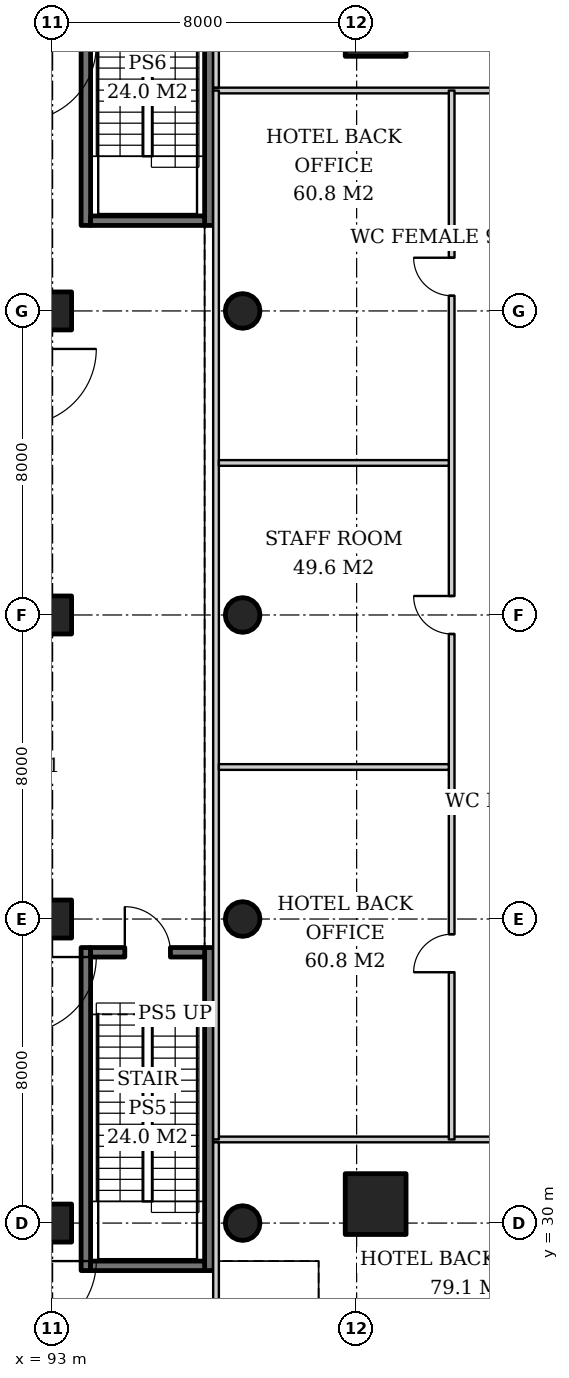
"""IFC4 building model, lengths in metres.
Left out: names, types, materials, properties, quantities, classifications, styles, units other than length and angle.
Written with IfcOpenShell. Run it as: python <this file> out.ifc"""

import sys

from ifc_helpers import new_model, si_unit, direction, frame, frame_2d, origin, origin_2d, place, context, subcontext, project, spatial, rectangle, hollow_circle, extrude, element, fill, save


model = new_model("IFC4")
c1 = context("Model", 3, precision=1e-05, world=origin(), true_north=direction((0.0, 1.0)))
c2 = subcontext(c1, "Body", "Model", "MODEL_VIEW")
j1 = project(units=[si_unit("LENGTHUNIT", "METRE"), si_unit("PLANEANGLEUNIT", "RADIAN")], contexts=[c1])
p1 = place(None, origin())
s1 = spatial("IfcSite", under=j1, at=p1, CompositionType="ELEMENT")
p2 = place(p1, origin())
s2 = spatial("IfcBuilding", under=s1, at=p2, CompositionType="ELEMENT")
p3 = place(p2, origin())
s3 = spatial("IfcBuildingStorey", under=s2, at=p3, CompositionType="ELEMENT", Elevation=0.0)
for number, where, z_axis, x_axis in (
    (1, (93.0, 30.0, 0.0), (0.0, 0.0, 1.0), (1.0, 0.0, 0.0)),
    (2, (93.0, 38.0, 0.0), (0.0, 0.0, 1.0), (1.0, 0.0, 0.0)),
    (3, (93.0, 46.0, 0.0), (0.0, 0.0, 1.0), (1.0, 0.0, 0.0)),
    (4, (93.0, 54.0, 0.0), (0.0, 0.0, 1.0), (1.0, 0.0, 0.0)),
):
    element("IfcColumn", number, at=place(p3, frame(where, z_axis=z_axis, x_axis=x_axis)), inside=s3, PredefinedType="COLUMN", context=c2, shape_type="SweptSolid", body=[
        extrude(rectangle(XDim=1.0, YDim=1.0, at=origin_2d()), origin(), (0.0, 0.0, 1.0), 6.0),
    ])
for number, where, z_axis, x_axis in (
    (5, (101.5, 61.5, 0.0), (0.0, 0.0, 1.0), (1.0, 0.0, 0.0)),
    (6, (101.5, 30.5, 0.0), (0.0, 0.0, 1.0), (1.0, 0.0, 0.0)),
):
    element("IfcColumn", number, at=place(p3, frame(where, z_axis=z_axis, x_axis=x_axis)), inside=s3, PredefinedType="COLUMN", context=c2, shape_type="SweptSolid", body=[
        extrude(rectangle(XDim=1.6, YDim=1.6, at=origin_2d()), origin(), (0.0, 0.0, 1.0), 6.0),
    ])
for number, where, z_axis, x_axis in (
    (7, (98.0, 30.0, 0.0), (0.0, 0.0, 1.0), (1.0, 0.0, 0.0)),
    (8, (98.0, 54.0, 0.0), (0.0, 0.0, 1.0), (1.0, 0.0, 0.0)),
    (9, (98.0, 46.0, 0.0), (0.0, 0.0, 1.0), (1.0, 0.0, 0.0)),
    (10, (98.0, 38.0, 0.0), (0.0, 0.0, 1.0), (1.0, 0.0, 0.0)),
):
    element("IfcColumn", number, at=place(p3, frame(where, z_axis=z_axis, x_axis=x_axis)), inside=s3, PredefinedType="COLUMN", context=c2, shape_type="SweptSolid", body=[
        extrude(hollow_circle(Radius=0.457, WallThickness=0.03, at=origin_2d()), origin(), (0.0, 0.0, 1.0), 6.0),
    ])
for number, where, z_axis, x_axis in (
    (11, (93.875, 28.75, 0.0), (0.0, 0.0, 1.0), (0.0, 1.0, 0.0)),
    (12, (97.125, 28.75, 0.0), (0.0, 0.0, 1.0), (0.0, 1.0, 0.0)),
):
    element("IfcWall", number, at=place(p3, frame(where, z_axis=z_axis, x_axis=x_axis)), inside=s3, PredefinedType="SOLIDWALL", context=c2, shape_type="SweptSolid", body=[
        extrude(rectangle(XDim=8.5, YDim=0.25, at=frame_2d((4.25, 0.0))), origin(), (0.0, 0.0, 1.0), 5.7),
    ])
p4 = place(p3, frame((94.0, 28.875, 0.0), z_axis=(0.0, 0.0, 1.0), x_axis=(1.0, 0.0, 0.0)))
e13 = element("IfcWall", 13, at=p4, inside=s3, PredefinedType="SOLIDWALL", context=c2, shape_type="SweptSolid", body=[
    extrude(rectangle(XDim=3.0, YDim=0.25, at=frame_2d((1.5, 0.0))), origin(), (0.0, 0.0, 1.0), 5.7),
])
p5 = place(p3, frame((94.0, 37.125, 0.0), z_axis=(0.0, 0.0, 1.0), x_axis=(1.0, 0.0, 0.0)))
e14 = element("IfcWall", 14, at=p5, inside=s3, PredefinedType="SOLIDWALL", context=c2, shape_type="SweptSolid", body=[
    extrude(rectangle(XDim=3.0, YDim=0.25, at=frame_2d((1.5, 0.0))), origin(), (0.0, 0.0, 1.0), 5.7),
])
p6 = place(p5, frame((0.9, 0.0, 0.0)))
e15 = element("IfcOpeningElement", 15, at=p6, cuts=e14, PredefinedType="OPENING", context=c2, shape_type="SweptSolid", body=[
    extrude(rectangle(XDim=1.2, YDim=2.1, at=frame_2d((0.6, 1.05))), frame((0.0, 0.135, 0.0), z_axis=(0.0, -1.0, 0.0), x_axis=(1.0, 0.0, 0.0)), (0.0, 0.0, 1.0), 0.27),
])
for number, where, z_axis, x_axis in (
    (16, (93.875, 56.25, 0.0), (0.0, 0.0, 1.0), (0.0, 1.0, 0.0)),
    (17, (97.125, 56.25, 0.0), (0.0, 0.0, 1.0), (0.0, 1.0, 0.0)),
):
    element("IfcWall", number, at=place(p3, frame(where, z_axis=z_axis, x_axis=x_axis)), inside=s3, PredefinedType="SOLIDWALL", context=c2, shape_type="SweptSolid", body=[
        extrude(rectangle(XDim=8.5, YDim=0.25, at=frame_2d((4.25, 0.0))), origin(), (0.0, 0.0, 1.0), 5.7),
    ])
p7 = place(p3, frame((94.0, 56.375, 0.0), z_axis=(0.0, 0.0, 1.0), x_axis=(1.0, 0.0, 0.0)))
e18 = element("IfcWall", 18, at=p7, inside=s3, PredefinedType="SOLIDWALL", context=c2, shape_type="SweptSolid", body=[
    extrude(rectangle(XDim=3.0, YDim=0.25, at=frame_2d((1.5, 0.0))), origin(), (0.0, 0.0, 1.0), 5.7),
])
p8 = place(p3, frame((97.225, 32.2, 0.0), z_axis=(0.0, 0.0, 1.0), x_axis=(1.0, 0.0, 0.0)))
e19 = element("IfcWall", 19, at=p8, inside=s3, PredefinedType="PARTITIONING", context=c2, shape_type="SweptSolid", body=[
    extrude(rectangle(XDim=13.4, YDim=0.15, at=frame_2d((6.7, 0.0))), origin(), (0.0, 0.0, 1.0), 4.9),
])
p9 = place(p8, frame((7.425, 0.0, 0.0)))
e20 = element("IfcOpeningElement", 20, at=p9, cuts=e19, PredefinedType="OPENING", context=c2, shape_type="SweptSolid", body=[
    extrude(rectangle(XDim=1.0, YDim=2.1, at=frame_2d((0.5, 1.05))), frame((0.0, 0.085, 0.0), z_axis=(0.0, -1.0, 0.0), x_axis=(1.0, 0.0, 0.0)), (0.0, 0.0, 1.0), 0.17),
])
p10 = place(p3, frame((97.3, 26.375, 0.0), z_axis=(0.0, 0.0, 1.0), x_axis=(0.0, 1.0, 0.0)))
e21 = element("IfcWall", 21, at=p10, inside=s3, PredefinedType="PARTITIONING", context=c2, shape_type="SweptSolid", body=[
    extrude(rectangle(XDim=5.75, YDim=0.15, at=frame_2d((2.875, 0.0))), origin(), (0.0, 0.0, 1.0), 5.7),
])
p11 = place(p3, frame((97.225, 59.8, 0.0), z_axis=(0.0, 0.0, 1.0), x_axis=(1.0, 0.0, 0.0)))
e22 = element("IfcWall", 22, at=p11, inside=s3, PredefinedType="PARTITIONING", context=c2, shape_type="SweptSolid", body=[
    extrude(rectangle(XDim=39.55, YDim=0.15, at=frame_2d((19.775, 0.0))), origin(), (0.0, 0.0, 1.0), 4.9),
])
p12 = place(p11, frame((7.425, 0.0, 0.0)))
e23 = element("IfcOpeningElement", 23, at=p12, cuts=e22, PredefinedType="OPENING", context=c2, shape_type="SweptSolid", body=[
    extrude(rectangle(XDim=1.0, YDim=2.1, at=frame_2d((0.5, 1.05))), frame((0.0, 0.085, 0.0), z_axis=(0.0, -1.0, 0.0), x_axis=(1.0, 0.0, 0.0)), (0.0, 0.0, 1.0), 0.17),
])
p13 = place(p11, frame((19.275, 0.0, 0.0)))
e24 = element("IfcOpeningElement", 24, at=p13, cuts=e22, PredefinedType="OPENING", context=c2, shape_type="SweptSolid", body=[
    extrude(rectangle(XDim=1.0, YDim=2.1, at=frame_2d((0.5, 1.05))), frame((0.0, 0.085, 0.0), z_axis=(0.0, -1.0, 0.0), x_axis=(1.0, 0.0, 0.0)), (0.0, 0.0, 1.0), 0.17),
])
p14 = place(p11, frame((31.125, 0.0, 0.0)))
e25 = element("IfcOpeningElement", 25, at=p14, cuts=e22, PredefinedType="OPENING", context=c2, shape_type="SweptSolid", body=[
    extrude(rectangle(XDim=1.0, YDim=2.1, at=frame_2d((0.5, 1.05))), frame((0.0, 0.085, 0.0), z_axis=(0.0, -1.0, 0.0), x_axis=(1.0, 0.0, 0.0)), (0.0, 0.0, 1.0), 0.17),
])
p15 = place(p3, frame((97.3, 59.875, 0.0), z_axis=(0.0, 0.0, 1.0), x_axis=(0.0, 1.0, 0.0)))
e26 = element("IfcWall", 26, at=p15, inside=s3, PredefinedType="PARTITIONING", context=c2, shape_type="SweptSolid", body=[
    extrude(rectangle(XDim=5.75, YDim=0.15, at=frame_2d((2.875, 0.0))), origin(), (0.0, 0.0, 1.0), 5.7),
])
p16 = place(p3, frame((97.3, 32.2, 0.0), z_axis=(0.0, 0.0, 1.0), x_axis=(0.0, 1.0, 0.0)))
e27 = element("IfcWall", 27, at=p16, inside=s3, PredefinedType="PARTITIONING", context=c2, shape_type="SweptSolid", body=[
    extrude(rectangle(XDim=27.6, YDim=0.15, at=frame_2d((13.8, 0.0))), origin(), (0.0, 0.0, 1.0), 5.7),
])
p17 = place(p3, frame((103.5, 32.2, 0.0), z_axis=(0.0, 0.0, 1.0), x_axis=(0.0, 1.0, 0.0)))
e28 = element("IfcWall", 28, at=p17, inside=s3, PredefinedType="PARTITIONING", context=c2, shape_type="SweptSolid", body=[
    extrude(rectangle(XDim=27.6, YDim=0.15, at=frame_2d((13.8, 0.0))), origin(), (0.0, 0.0, 1.0), 4.9),
])
p18 = place(p17, frame((4.4, 0.0, 0.0)))
e29 = element("IfcOpeningElement", 29, at=p18, cuts=e28, PredefinedType="OPENING", context=c2, shape_type="SweptSolid", body=[
    extrude(rectangle(XDim=1.0, YDim=2.1, at=frame_2d((0.5, 1.05))), frame((0.0, 0.085, 0.0), z_axis=(0.0, -1.0, 0.0), x_axis=(1.0, 0.0, 0.0)), (0.0, 0.0, 1.0), 0.17),
])
p19 = place(p17, frame((13.3, 0.0, 0.0)))
e30 = element("IfcOpeningElement", 30, at=p19, cuts=e28, PredefinedType="OPENING", context=c2, shape_type="SweptSolid", body=[
    extrude(rectangle(XDim=1.0, YDim=2.1, at=frame_2d((0.5, 1.05))), frame((0.0, 0.085, 0.0), z_axis=(0.0, -1.0, 0.0), x_axis=(1.0, 0.0, 0.0)), (0.0, 0.0, 1.0), 0.17),
])
p20 = place(p17, frame((22.2, 0.0, 0.0)))
e31 = element("IfcOpeningElement", 31, at=p20, cuts=e28, PredefinedType="OPENING", context=c2, shape_type="SweptSolid", body=[
    extrude(rectangle(XDim=1.0, YDim=2.1, at=frame_2d((0.5, 1.05))), frame((0.0, 0.085, 0.0), z_axis=(0.0, -1.0, 0.0), x_axis=(1.0, 0.0, 0.0)), (0.0, 0.0, 1.0), 0.17),
])
for number, where, z_axis, x_axis in (
    (32, (97.375, 42.0, 0.0), (0.0, 0.0, 1.0), (1.0, 0.0, 0.0)),
    (33, (97.375, 50.0, 0.0), (0.0, 0.0, 1.0), (1.0, 0.0, 0.0)),
):
    element("IfcWall", number, at=place(p3, frame(where, z_axis=z_axis, x_axis=x_axis)), inside=s3, PredefinedType="PARTITIONING", context=c2, shape_type="SweptSolid", body=[
        extrude(rectangle(XDim=6.05, YDim=0.15, at=frame_2d((3.025, 0.0))), origin(), (0.0, 0.0, 1.0), 5.15),
    ])
p21 = place(p6, origin())
e34 = element("IfcDoor", 34, at=p21, inside=s3, OperationType="SINGLE_SWING_LEFT", PredefinedType="DOOR", context=c2, shape_type="SweptSolid", body=[
    extrude(rectangle(XDim=1.2, YDim=2.1, at=frame_2d((0.6, 1.05))), frame((0.0, 0.025, 0.0), z_axis=(0.0, -1.0, 0.0), x_axis=(1.0, 0.0, 0.0)), (0.0, 0.0, 1.0), 0.05),
])
fill(e15, e34)
p22 = place(p18, origin())
e35 = element("IfcDoor", 35, at=p22, inside=s3, OperationType="SINGLE_SWING_LEFT", PredefinedType="DOOR", context=c2, shape_type="SweptSolid", body=[
    extrude(rectangle(XDim=1.0, YDim=2.1, at=frame_2d((0.5, 1.05))), frame((0.0, 0.025, 0.0), z_axis=(0.0, -1.0, 0.0), x_axis=(1.0, 0.0, 0.0)), (0.0, 0.0, 1.0), 0.05),
])
fill(e29, e35)
p23 = place(p19, origin())
e36 = element("IfcDoor", 36, at=p23, inside=s3, OperationType="SINGLE_SWING_RIGHT", PredefinedType="DOOR", context=c2, shape_type="SweptSolid", body=[
    extrude(rectangle(XDim=1.0, YDim=2.1, at=frame_2d((0.5, 1.05))), frame((0.0, 0.025, 0.0), z_axis=(0.0, -1.0, 0.0), x_axis=(1.0, 0.0, 0.0)), (0.0, 0.0, 1.0), 0.05),
])
fill(e30, e36)
p24 = place(p20, origin())
e37 = element("IfcDoor", 37, at=p24, inside=s3, OperationType="SINGLE_SWING_RIGHT", PredefinedType="DOOR", context=c2, shape_type="SweptSolid", body=[
    extrude(rectangle(XDim=1.0, YDim=2.1, at=frame_2d((0.5, 1.05))), frame((0.0, 0.025, 0.0), z_axis=(0.0, -1.0, 0.0), x_axis=(1.0, 0.0, 0.0)), (0.0, 0.0, 1.0), 0.05),
])
fill(e31, e37)
save(model, sys.argv[1])
